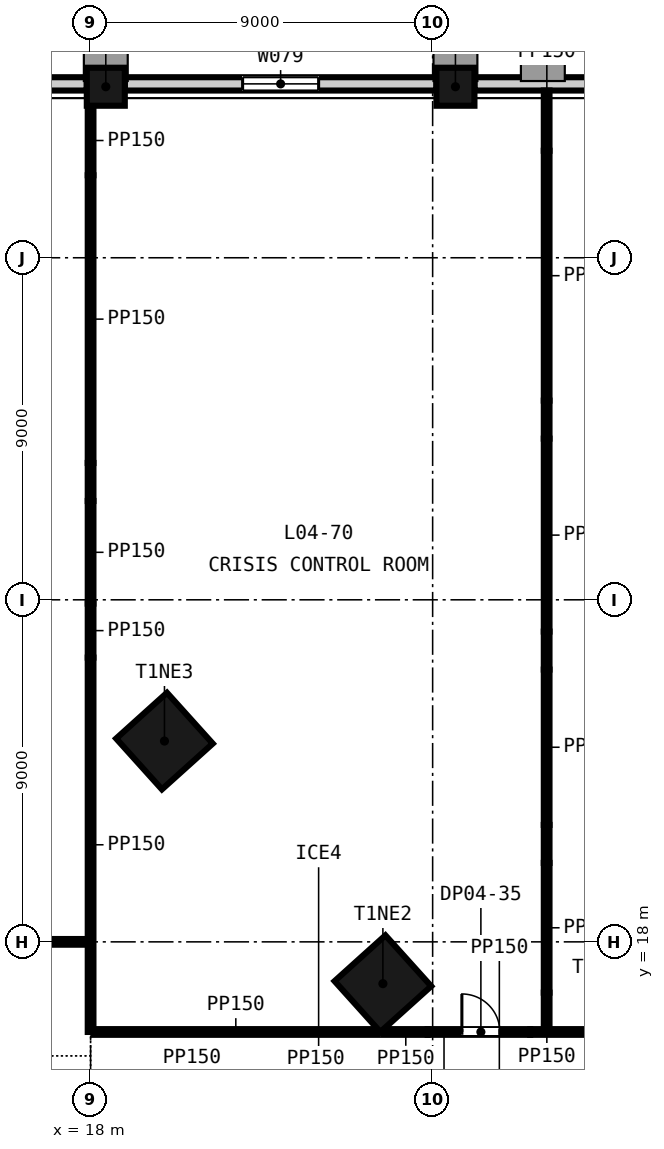
"""IFC4 building model, lengths in metres.
Left out: names, types, materials, properties, quantities, classifications, styles, units other than length and angle.
Written with IfcOpenShell. Run it as: python <this file> out.ifc"""

import sys

from ifc_helpers import new_model, si_unit, direction, frame, frame_2d, origin, origin_2d, place, context, subcontext, project, spatial, rectangle, extrude, element, fill, save


model = new_model("IFC4")
c1 = context("Model", 3, precision=1e-05, world=origin(), true_north=direction((0.0, 1.0)))
c2 = subcontext(c1, "Body", "Model", "MODEL_VIEW")
j1 = project(units=[si_unit("LENGTHUNIT", "METRE"), si_unit("PLANEANGLEUNIT", "RADIAN")], contexts=[c1])
p1 = place(None, origin())
s1 = spatial("IfcSite", under=j1, at=p1, CompositionType="ELEMENT")
p2 = place(p1, origin())
s2 = spatial("IfcBuilding", under=s1, at=p2, CompositionType="ELEMENT")
p3 = place(p2, frame((0.0, 0.0, 27.0)))
s3 = spatial("IfcBuildingStorey", under=s2, at=p3, CompositionType="ELEMENT", Elevation=27.0)
for number, where, z_axis, x_axis in (
    (1, (25.691, 16.9, -0.3), (0.0, 0.0, 1.0), (-0.669, 0.743, 0.0)),
    (2, (19.944, 23.283, -0.3), (0.0, 0.0, 1.0), (-0.669, 0.743, 0.0)),
):
    element("IfcColumn", number, at=place(p3, frame(where, z_axis=z_axis, x_axis=x_axis)), inside=s3, PredefinedType="COLUMN", context=c2, shape_type="SweptSolid", body=[
        extrude(rectangle(XDim=1.8, YDim=1.8, at=origin_2d()), origin(), (0.0, 0.0, 1.0), 4.5),
    ])
for number, where, z_axis, x_axis in (
    (3, (27.6, 40.5, -0.3), (0.0, 0.0, 1.0), (-1.0, 0.0, 0.0)),
    (4, (18.4, 40.5, -0.3), (0.0, 0.0, 1.0), (-1.0, 0.0, 0.0)),
):
    element("IfcColumn", number, at=place(p3, frame(where, z_axis=z_axis, x_axis=x_axis)), inside=s3, PredefinedType="COLUMN", context=c2, shape_type="SweptSolid", body=[
        extrude(rectangle(XDim=1.0, YDim=1.0, at=origin_2d()), origin(), (0.0, 0.0, 1.0), 4.5),
    ])
p4 = place(p3, frame((36.3, 40.575, -0.3), z_axis=(0.0, 0.0, 1.0), x_axis=(-1.0, 0.0, 0.0)))
e5 = element("IfcWall", 5, at=p4, inside=s3, PredefinedType="SOLIDWALL", context=c2, shape_type="SweptSolid", body=[
    extrude(rectangle(XDim=8.2, YDim=0.35, at=frame_2d((4.1, 0.0))), origin(), (0.0, 0.0, 1.0), 3.6),
])
p5 = place(p4, frame((3.1, 0.0, 1.2)))
e6 = element("IfcOpeningElement", 6, at=p5, cuts=e5, PredefinedType="OPENING", context=c2, shape_type="SweptSolid", body=[
    extrude(rectangle(XDim=2.0, YDim=2.35, at=frame_2d((1.0, 1.175))), frame((0.0, 0.185, 0.0), z_axis=(0.0, -1.0, 0.0), x_axis=(1.0, 0.0, 0.0)), (0.0, 0.0, 1.0), 0.37),
])
p6 = place(p3, frame((27.1, 40.575, -0.3), z_axis=(0.0, 0.0, 1.0), x_axis=(-1.0, 0.0, 0.0)))
e7 = element("IfcWall", 7, at=p6, inside=s3, PredefinedType="SOLIDWALL", context=c2, shape_type="SweptSolid", body=[
    extrude(rectangle(XDim=8.2, YDim=0.35, at=frame_2d((4.1, 0.0))), origin(), (0.0, 0.0, 1.0), 3.6),
])
p7 = place(p6, frame((3.1, 0.0, 1.2)))
e8 = element("IfcOpeningElement", 8, at=p7, cuts=e7, PredefinedType="OPENING", context=c2, shape_type="SweptSolid", body=[
    extrude(rectangle(XDim=2.0, YDim=2.35, at=frame_2d((1.0, 1.175))), frame((0.0, 0.185, 0.0), z_axis=(0.0, -1.0, 0.0), x_axis=(1.0, 0.0, 0.0)), (0.0, 0.0, 1.0), 0.37),
])
p8 = place(p3, frame((17.9, 40.575, -0.3), z_axis=(0.0, 0.0, 1.0), x_axis=(-1.0, 0.0, 0.0)))
e9 = element("IfcWall", 9, at=p8, inside=s3, PredefinedType="SOLIDWALL", context=c2, shape_type="SweptSolid", body=[
    extrude(rectangle(XDim=8.2, YDim=0.35, at=frame_2d((4.1, 0.0))), origin(), (0.0, 0.0, 1.0), 3.6),
])
p9 = place(p8, frame((3.1, 0.0, 1.2)))
e10 = element("IfcOpeningElement", 10, at=p9, cuts=e9, PredefinedType="OPENING", context=c2, shape_type="SweptSolid", body=[
    extrude(rectangle(XDim=2.0, YDim=2.35, at=frame_2d((1.0, 1.175))), frame((0.0, 0.185, 0.0), z_axis=(0.0, -1.0, 0.0), x_axis=(1.0, 0.0, 0.0)), (0.0, 0.0, 1.0), 0.37),
])
p10 = place(p3, frame((18.075, 15.629, 0.0), z_axis=(0.0, 0.0, 1.0), x_axis=(1.0, 0.0, 0.0)))
e11 = element("IfcWall", 11, at=p10, inside=s3, PredefinedType="PARTITIONING", context=c2, shape_type="SweptSolid", body=[
    extrude(rectangle(XDim=7.482, YDim=0.15, at=frame_2d((3.741, 0.0))), origin(), (0.0, 0.0, 1.0), 4.2),
])
p11 = place(p3, frame((25.708, 15.629, 0.0), z_axis=(0.0, 0.0, 1.0), x_axis=(1.0, 0.0, 0.0)))
e12 = element("IfcWall", 12, at=p11, inside=s3, PredefinedType="PARTITIONING", context=c2, shape_type="SweptSolid", body=[
    extrude(rectangle(XDim=1.162, YDim=0.15, at=frame_2d((0.581, 0.0))), origin(), (0.0, 0.0, 1.0), 4.2),
])
p12 = place(p3, frame((26.869, 15.629, 0.0), z_axis=(0.0, 0.0, 1.0), x_axis=(1.0, 0.0, 0.0)))
e13 = element("IfcWall", 13, at=p12, inside=s3, PredefinedType="PARTITIONING", context=c2, shape_type="SweptSolid", body=[
    extrude(rectangle(XDim=2.698, YDim=0.15, at=frame_2d((1.349, 0.0))), origin(), (0.0, 0.0, 1.0), 3.111),
])
p13 = place(p12, frame((0.9, 0.0, 0.0)))
e14 = element("IfcOpeningElement", 14, at=p13, cuts=e13, PredefinedType="OPENING", context=c2, shape_type="SweptSolid", body=[
    extrude(rectangle(XDim=1.0, YDim=2.1, at=frame_2d((0.5, 1.05))), frame((0.0, 0.085, 0.0), z_axis=(0.0, -1.0, 0.0), x_axis=(1.0, 0.0, 0.0)), (0.0, 0.0, 1.0), 0.17),
])
p14 = place(p3, frame((29.567, 15.629, 0.0), z_axis=(0.0, 0.0, 1.0), x_axis=(1.0, 0.0, 0.0)))
e15 = element("IfcWall", 15, at=p14, inside=s3, PredefinedType="PARTITIONING", context=c2, shape_type="SweptSolid", body=[
    extrude(rectangle(XDim=8.548, YDim=0.15, at=frame_2d((4.274, 0.0))), origin(), (0.0, 0.0, 1.0), 4.2),
])
p15 = place(p3, frame((-26.142, 18.0, 0.0), z_axis=(0.0, 0.0, 1.0), x_axis=(1.0, 0.0, 0.0)))
e16 = element("IfcWall", 16, at=p15, inside=s3, PredefinedType="PARTITIONING", context=c2, shape_type="SweptSolid", body=[
    extrude(rectangle(XDim=44.067, YDim=0.15, at=frame_2d((22.034, 0.0))), origin(), (0.0, 0.0, 1.0), 4.2),
])
p16 = place(p15, frame((0.15, 0.0, 0.0)))
e17 = element("IfcOpeningElement", 17, at=p16, cuts=e16, PredefinedType="OPENING", context=c2, shape_type="SweptSolid", body=[
    extrude(rectangle(XDim=1.8, YDim=2.4, at=frame_2d((0.9, 1.2))), frame((0.0, 0.085, 0.0), z_axis=(0.0, -1.0, 0.0), x_axis=(1.0, 0.0, 0.0)), (0.0, 0.0, 1.0), 0.17),
])
p17 = place(p15, frame((12.292, 0.0, 0.0)))
e18 = element("IfcOpeningElement", 18, at=p17, cuts=e16, PredefinedType="OPENING", context=c2, shape_type="SweptSolid", body=[
    extrude(rectangle(XDim=1.8, YDim=2.4, at=frame_2d((0.9, 1.2))), frame((0.0, 0.085, 0.0), z_axis=(0.0, -1.0, 0.0), x_axis=(1.0, 0.0, 0.0)), (0.0, 0.0, 1.0), 0.17),
])
p18 = place(p15, frame((29.542, 0.0, 0.0)))
e19 = element("IfcOpeningElement", 19, at=p18, cuts=e16, PredefinedType="OPENING", context=c2, shape_type="SweptSolid", body=[
    extrude(rectangle(XDim=1.0, YDim=2.1, at=frame_2d((0.5, 1.05))), frame((0.0, 0.085, 0.0), z_axis=(0.0, -1.0, 0.0), x_axis=(1.0, 0.0, 0.0)), (0.0, 0.0, 1.0), 0.17),
])
p19 = place(p15, frame((38.542, 0.0, 0.0)))
e20 = element("IfcOpeningElement", 20, at=p19, cuts=e16, PredefinedType="OPENING", context=c2, shape_type="SweptSolid", body=[
    extrude(rectangle(XDim=1.0, YDim=2.1, at=frame_2d((0.5, 1.05))), frame((0.0, 0.085, 0.0), z_axis=(0.0, -1.0, 0.0), x_axis=(1.0, 0.0, 0.0)), (0.0, 0.0, 1.0), 0.17),
])
p20 = place(p3, frame((18.0, 15.629, 0.0), z_axis=(0.0, 0.0, 1.0), x_axis=(0.0, 1.0, 0.0)))
e21 = element("IfcWall", 21, at=p20, inside=s3, PredefinedType="PARTITIONING", context=c2, shape_type="SweptSolid", body=[
    extrude(rectangle(XDim=9.85, YDim=0.15, at=frame_2d((4.925, 0.0))), origin(), (0.0, 0.0, 1.0), 4.2),
])
p21 = place(p3, frame((18.0, 25.479, 0.0), z_axis=(0.0, 0.0, 1.0), x_axis=(0.0, 1.0, 0.0)))
e22 = element("IfcWall", 22, at=p21, inside=s3, PredefinedType="PARTITIONING", context=c2, shape_type="SweptSolid", body=[
    extrude(rectangle(XDim=1.42, YDim=0.15, at=frame_2d((0.71, 0.0))), origin(), (0.0, 0.0, 1.0), 3.2),
])
p22 = place(p3, frame((18.0, 26.899, 0.0), z_axis=(0.0, 0.0, 1.0), x_axis=(0.0, 1.0, 0.0)))
e23 = element("IfcWall", 23, at=p22, inside=s3, PredefinedType="PARTITIONING", context=c2, shape_type="SweptSolid", body=[
    extrude(rectangle(XDim=2.701, YDim=0.15, at=frame_2d((1.35, 0.0))), origin(), (0.0, 0.0, 1.0), 4.2),
])
p23 = place(p3, frame((18.0, 29.6, 0.0), z_axis=(0.0, 0.0, 1.0), x_axis=(0.0, 1.0, 0.0)))
e24 = element("IfcWall", 24, at=p23, inside=s3, PredefinedType="PARTITIONING", context=c2, shape_type="SweptSolid", body=[
    extrude(rectangle(XDim=1.0, YDim=0.15, at=frame_2d((0.5, 0.0))), origin(), (0.0, 0.0, 1.0), 3.441),
])
p24 = place(p3, frame((18.0, 30.6, 0.0), z_axis=(0.0, 0.0, 1.0), x_axis=(0.0, 1.0, 0.0)))
e25 = element("IfcWall", 25, at=p24, inside=s3, PredefinedType="PARTITIONING", context=c2, shape_type="SweptSolid", body=[
    extrude(rectangle(XDim=7.57, YDim=0.15, at=frame_2d((3.785, 0.0))), origin(), (0.0, 0.0, 1.0), 4.2),
])
p25 = place(p3, frame((18.0, 38.17, 0.0), z_axis=(0.0, 0.0, 1.0), x_axis=(0.0, 1.0, 0.0)))
e26 = element("IfcWall", 26, at=p25, inside=s3, PredefinedType="PARTITIONING", context=c2, shape_type="SweptSolid", body=[
    extrude(rectangle(XDim=1.83, YDim=0.15, at=frame_2d((0.915, 0.0))), origin(), (0.0, 0.0, 1.0), 3.521),
])
p26 = place(p3, frame((30.0, 15.704, 0.0), z_axis=(0.0, 0.0, 1.0), x_axis=(0.0, 1.0, 0.0)))
e27 = element("IfcWall", 27, at=p26, inside=s3, PredefinedType="PARTITIONING", context=c2, shape_type="SweptSolid", body=[
    extrude(rectangle(XDim=0.96, YDim=0.15, at=frame_2d((0.48, 0.0))), origin(), (0.0, 0.0, 1.0), 3.111),
])
p27 = place(p3, frame((30.0, 16.664, 0.0), z_axis=(0.0, 0.0, 1.0), x_axis=(0.0, 1.0, 0.0)))
e28 = element("IfcWall", 28, at=p27, inside=s3, PredefinedType="PARTITIONING", context=c2, shape_type="SweptSolid", body=[
    extrude(rectangle(XDim=3.413, YDim=0.15, at=frame_2d((1.707, 0.0))), origin(), (0.0, 0.0, 1.0), 4.2),
])
p28 = place(p3, frame((30.0, 20.077, 0.0), z_axis=(0.0, 0.0, 1.0), x_axis=(0.0, 1.0, 0.0)))
e29 = element("IfcWall", 29, at=p28, inside=s3, PredefinedType="PARTITIONING", context=c2, shape_type="SweptSolid", body=[
    extrude(rectangle(XDim=1.0, YDim=0.15, at=frame_2d((0.5, 0.0))), origin(), (0.0, 0.0, 1.0), 3.111),
])
p29 = place(p3, frame((30.0, 21.077, 0.0), z_axis=(0.0, 0.0, 1.0), x_axis=(0.0, 1.0, 0.0)))
e30 = element("IfcWall", 30, at=p29, inside=s3, PredefinedType="PARTITIONING", context=c2, shape_type="SweptSolid", body=[
    extrude(rectangle(XDim=4.087, YDim=0.15, at=frame_2d((2.043, 0.0))), origin(), (0.0, 0.0, 1.0), 4.2),
])
p30 = place(p3, frame((30.0, 25.164, 0.0), z_axis=(0.0, 0.0, 1.0), x_axis=(0.0, 1.0, 0.0)))
e31 = element("IfcWall", 31, at=p30, inside=s3, PredefinedType="PARTITIONING", context=c2, shape_type="SweptSolid", body=[
    extrude(rectangle(XDim=1.0, YDim=0.15, at=frame_2d((0.5, 0.0))), origin(), (0.0, 0.0, 1.0), 3.111),
])
p31 = place(p3, frame((30.0, 26.164, 0.0), z_axis=(0.0, 0.0, 1.0), x_axis=(0.0, 1.0, 0.0)))
e32 = element("IfcWall", 32, at=p31, inside=s3, PredefinedType="PARTITIONING", context=c2, shape_type="SweptSolid", body=[
    extrude(rectangle(XDim=5.076, YDim=0.15, at=frame_2d((2.538, 0.0))), origin(), (0.0, 0.0, 1.0), 4.2),
])
p32 = place(p3, frame((30.0, 31.24, 0.0), z_axis=(0.0, 0.0, 1.0), x_axis=(0.0, 1.0, 0.0)))
e33 = element("IfcWall", 33, at=p32, inside=s3, PredefinedType="PARTITIONING", context=c2, shape_type="SweptSolid", body=[
    extrude(rectangle(XDim=1.0, YDim=0.15, at=frame_2d((0.5, 0.0))), origin(), (0.0, 0.0, 1.0), 3.111),
])
p33 = place(p3, frame((30.0, 32.24, 0.0), z_axis=(0.0, 0.0, 1.0), x_axis=(0.0, 1.0, 0.0)))
e34 = element("IfcWall", 34, at=p33, inside=s3, PredefinedType="PARTITIONING", context=c2, shape_type="SweptSolid", body=[
    extrude(rectangle(XDim=6.575, YDim=0.15, at=frame_2d((3.288, 0.0))), origin(), (0.0, 0.0, 1.0), 4.2),
])
p34 = place(p3, frame((30.0, 38.816, 0.0), z_axis=(0.0, 0.0, 1.0), x_axis=(0.0, 1.0, 0.0)))
e35 = element("IfcWall", 35, at=p34, inside=s3, PredefinedType="PARTITIONING", context=c2, shape_type="SweptSolid", body=[
    extrude(rectangle(XDim=1.584, YDim=0.15, at=frame_2d((0.792, 0.0))), origin(), (0.0, 0.0, 1.0), 3.298),
])
p35 = place(p7, origin())
e36 = element("IfcWindow", 36, at=p35, inside=s3, PartitioningType="SINGLE_PANEL", PredefinedType="WINDOW", context=c2, shape_type="SweptSolid", body=[
    extrude(rectangle(XDim=2.0, YDim=2.35, at=frame_2d((1.0, 1.175))), frame((0.0, 0.03, 0.0), z_axis=(0.0, -1.0, 0.0), x_axis=(1.0, 0.0, 0.0)), (0.0, 0.0, 1.0), 0.06),
])
fill(e8, e36)
p36 = place(p13, origin())
e37 = element("IfcDoor", 37, at=p36, inside=s3, OperationType="SINGLE_SWING_LEFT", PredefinedType="DOOR", context=c2, shape_type="SweptSolid", body=[
    extrude(rectangle(XDim=1.0, YDim=2.1, at=frame_2d((0.5, 1.05))), frame((0.0, 0.025, 0.0), z_axis=(0.0, -1.0, 0.0), x_axis=(1.0, 0.0, 0.0)), (0.0, 0.0, 1.0), 0.05),
])
fill(e14, e37)
save(model, sys.argv[1])
